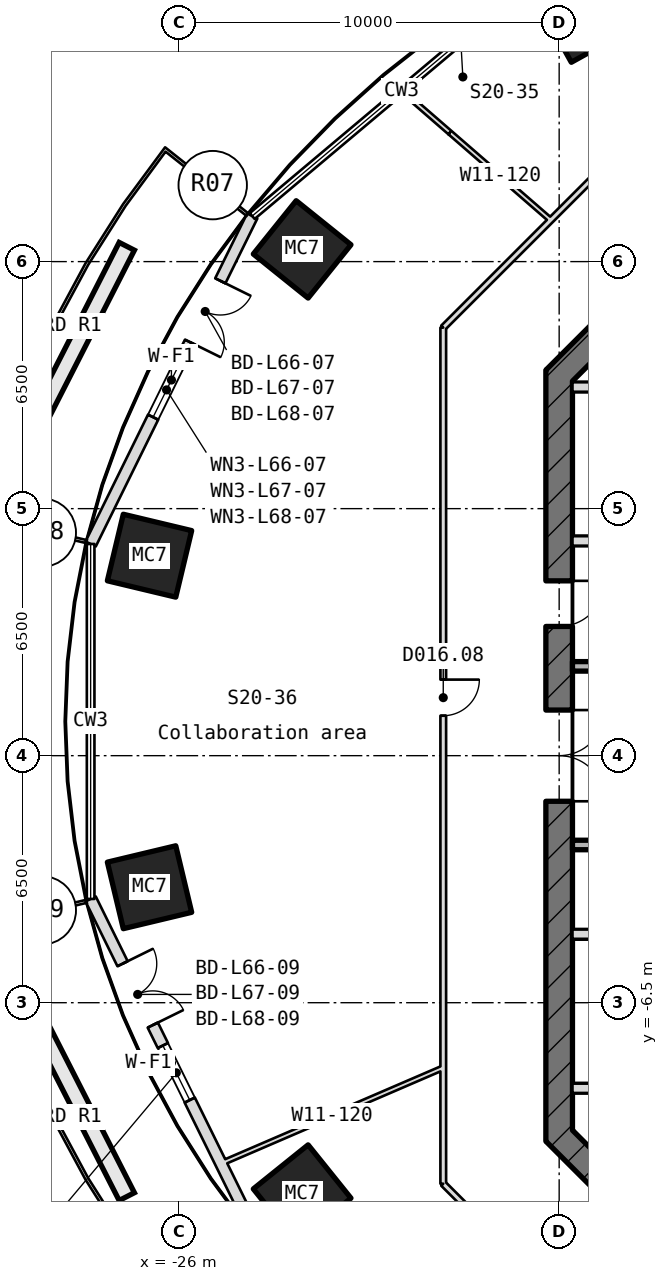
"""IFC4 building model, lengths in metres.
Left out: names, types, materials, properties, quantities, classifications, styles, units other than length and angle.
Written with IfcOpenShell. Run it as: python <this file> out.ifc"""

import sys

from ifc_helpers import new_model, si_unit, direction, frame, frame_2d, origin, origin_2d, place, context, subcontext, project, spatial, rectangle, hollow_rectangle, extrude, element, fill, save


model = new_model("IFC4")
c1 = context("Model", 3, precision=1e-05, world=origin(), true_north=direction((0.0, 1.0)))
c2 = subcontext(c1, "Body", "Model", "MODEL_VIEW")
j1 = project(units=[si_unit("LENGTHUNIT", "METRE"), si_unit("PLANEANGLEUNIT", "RADIAN")], contexts=[c1])
p1 = place(None, origin())
s1 = spatial("IfcSite", under=j1, at=p1, CompositionType="ELEMENT")
p2 = place(p1, origin())
s2 = spatial("IfcBuilding", under=s1, at=p2, CompositionType="ELEMENT")
p3 = place(p2, frame((0.0, 0.0, 296.95)))
s3 = spatial("IfcBuildingStorey", under=s2, at=p3, CompositionType="ELEMENT", Elevation=296.95)
for number, where, z_axis, x_axis in (
    (1, (-15.343, 19.49, -0.18), (0.0, 0.0, 1.0), (0.874, 0.486, 0.0)),
    (2, (-22.763, 13.321, -0.18), (0.0, 0.0, 1.0), (0.626, 0.779, 0.0)),
    (3, (-26.779, 5.262, -0.18), (0.0, 0.0, 1.0), (0.233, 0.973, 0.0)),
    (4, (-26.779, -3.462, -0.18), (0.0, 0.0, 1.0), (-0.233, 0.973, 0.0)),
    (5, (-22.763, -11.521, -0.18), (0.0, 0.0, 1.0), (-0.626, 0.779, 0.0)),
):
    element("IfcColumn", number, at=place(p3, frame(where, z_axis=z_axis, x_axis=x_axis)), inside=s3, PredefinedType="COLUMN", context=c2, shape_type="SweptSolid", body=[
        extrude(hollow_rectangle(XDim=1.8, YDim=1.85, WallThickness=0.06, at=origin_2d()), origin(), (0.0, 0.0, 1.0), 4.15),
    ])
p4 = place(p3, frame((-24.077, 14.199, 0.0), z_axis=(0.0, 0.0, 1.0), x_axis=(-0.441998272381, -0.897015901315, 0.0)))
e6 = element("IfcWall", 6, at=p4, inside=s3, PredefinedType="SOLIDWALL", context=c2, shape_type="SweptSolid", body=[
    extrude(rectangle(XDim=9.62, YDim=0.3, at=frame_2d((4.81, 0.0))), origin(), (0.0, 0.0, 1.0), 3.97),
])
p5 = place(p4, frame((1.9, 0.0, 0.0)))
e7 = element("IfcOpeningElement", 7, at=p5, cuts=e6, PredefinedType="OPENING", context=c2, shape_type="SweptSolid", body=[
    extrude(rectangle(XDim=1.8, YDim=2.4, at=frame_2d((0.9, 1.2))), frame((0.0, 0.16, 0.0), z_axis=(0.0, -1.0, 0.0), x_axis=(1.0, 0.0, 0.0)), (0.0, 0.0, 1.0), 0.32),
])
p6 = place(p4, frame((4.3, 0.0, 0.9)))
e8 = element("IfcOpeningElement", 8, at=p6, cuts=e6, PredefinedType="OPENING", context=c2, shape_type="SweptSolid", body=[
    extrude(rectangle(XDim=1.6, YDim=1.5, at=frame_2d((0.8, 0.75))), frame((0.0, 0.16, 0.0), z_axis=(0.0, -1.0, 0.0), x_axis=(1.0, 0.0, 0.0)), (0.0, 0.0, 1.0), 0.32),
])
p7 = place(p3, frame((-28.329, -3.77, 0.0), z_axis=(0.0, 0.0, 1.0), x_axis=(0.441998272381, -0.897015901315, 0.0)))
e9 = element("IfcWall", 9, at=p7, inside=s3, PredefinedType="SOLIDWALL", context=c2, shape_type="SweptSolid", body=[
    extrude(rectangle(XDim=9.62, YDim=0.3, at=frame_2d((4.81, 0.0))), origin(), (0.0, 0.0, 1.0), 3.97),
])
p8 = place(p7, frame((1.9, 0.0, 0.0)))
e10 = element("IfcOpeningElement", 10, at=p8, cuts=e9, PredefinedType="OPENING", context=c2, shape_type="SweptSolid", body=[
    extrude(rectangle(XDim=1.8, YDim=2.4, at=frame_2d((0.9, 1.2))), frame((0.0, 0.16, 0.0), z_axis=(0.0, -1.0, 0.0), x_axis=(1.0, 0.0, 0.0)), (0.0, 0.0, 1.0), 0.32),
])
p9 = place(p7, frame((4.3, 0.0, 0.9)))
e11 = element("IfcOpeningElement", 11, at=p9, cuts=e9, PredefinedType="OPENING", context=c2, shape_type="SweptSolid", body=[
    extrude(rectangle(XDim=1.6, YDim=1.5, at=frame_2d((0.8, 0.75))), frame((0.0, 0.16, 0.0), z_axis=(0.0, -1.0, 0.0), x_axis=(1.0, 0.0, 0.0)), (0.0, 0.0, 1.0), 0.32),
])
p10 = place(p3, frame((-12.897, 13.103, -0.18), z_axis=(0.0, 0.0, 1.0), x_axis=(-0.707106781187, -0.707106781187, 0.0)))
e12 = element("IfcWall", 12, at=p10, inside=s3, PredefinedType="SHEAR", context=c2, shape_type="SweptSolid", body=[
    extrude(rectangle(XDim=4.533, YDim=0.7, at=frame_2d((2.266, 0.0))), origin(), (0.0, 0.0, 1.0), 4.15),
])
p11 = place(p3, frame((-16.0, 10.145, -0.18), z_axis=(0.0, 0.0, 1.0), x_axis=(0.0, -1.0, 0.0)))
e13 = element("IfcWall", 13, at=p11, inside=s3, PredefinedType="SHEAR", context=c2, shape_type="SweptSolid", body=[
    extrude(rectangle(XDim=20.29, YDim=0.7, at=frame_2d((10.145, 0.0))), origin(), (0.0, 0.0, 1.0), 4.15),
])
p12 = place(p11, frame((8.945, 0.0, 0.18)))
e14 = element("IfcOpeningElement", 14, at=p12, cuts=e13, PredefinedType="OPENING", context=c2, shape_type="SweptSolid", body=[
    extrude(rectangle(XDim=2.4, YDim=2.1, at=frame_2d((1.2, 1.05))), frame((0.0, 0.36, 0.0), z_axis=(0.0, -1.0, 0.0), x_axis=(1.0, 0.0, 0.0)), (0.0, 0.0, 1.0), 0.72),
])
p13 = place(p11, frame((5.545, 0.0, 0.18)))
e15 = element("IfcOpeningElement", 15, at=p13, cuts=e13, PredefinedType="OPENING", context=c2, shape_type="SweptSolid", body=[
    extrude(rectangle(XDim=1.2, YDim=2.1, at=frame_2d((0.6, 1.05))), frame((0.0, 0.36, 0.0), z_axis=(0.0, -1.0, 0.0), x_axis=(1.0, 0.0, 0.0)), (0.0, 0.0, 1.0), 0.72),
])
p14 = place(p3, frame((-16.103, -9.897, -0.18), z_axis=(0.0, 0.0, 1.0), x_axis=(0.707106781187, -0.707106781187, 0.0)))
e16 = element("IfcWall", 16, at=p14, inside=s3, PredefinedType="SHEAR", context=c2, shape_type="SweptSolid", body=[
    extrude(rectangle(XDim=4.533, YDim=0.7, at=frame_2d((2.266, 0.0))), origin(), (0.0, 0.0, 1.0), 4.15),
])
p15 = place(p3, frame((-15.65, -8.75, -0.18), z_axis=(0.0, 0.0, 1.0), x_axis=(1.0, 0.0, 0.0)))
e17 = element("IfcWall", 17, at=p15, inside=s3, PredefinedType="SHEAR", context=c2, shape_type="SweptSolid", body=[
    extrude(rectangle(XDim=7.1, YDim=0.25, at=frame_2d((3.55, 0.0))), origin(), (0.0, 0.0, 1.0), 4.15),
])
p16 = place(p15, frame((5.6, 0.0, 0.18)))
e18 = element("IfcOpeningElement", 18, at=p16, cuts=e17, PredefinedType="OPENING", context=c2, shape_type="SweptSolid", body=[
    extrude(rectangle(XDim=1.2, YDim=2.1, at=frame_2d((0.6, 1.05))), frame((0.0, 0.135, 0.0), z_axis=(0.0, -1.0, 0.0), x_axis=(1.0, 0.0, 0.0)), (0.0, 0.0, 1.0), 0.27),
])
p17 = place(p3, frame((-15.65, -4.7, -0.18), z_axis=(0.0, 0.0, 1.0), x_axis=(1.0, 0.0, 0.0)))
e19 = element("IfcWall", 19, at=p17, inside=s3, PredefinedType="SHEAR", context=c2, shape_type="SweptSolid", body=[
    extrude(rectangle(XDim=7.1, YDim=0.25, at=frame_2d((3.55, 0.0))), origin(), (0.0, 0.0, 1.0), 4.15),
])
for number, where, z_axis, x_axis in (
    (20, (-15.65, -2.35, 0.0), (0.0, 0.0, 1.0), (1.0, 0.0, 0.0)),
    (21, (-15.65, 2.35, 0.0), (0.0, 0.0, 1.0), (1.0, 0.0, 0.0)),
):
    element("IfcWall", number, at=place(p3, frame(where, z_axis=z_axis, x_axis=x_axis)), inside=s3, PredefinedType="STANDARD", context=c2, shape_type="SweptSolid", body=[
        extrude(rectangle(XDim=7.25, YDim=0.25, at=frame_2d((3.625, 0.0))), origin(), (0.0, 0.0, 1.0), 3.97),
    ])
p18 = place(p3, frame((-15.65, 5.65, -0.18), z_axis=(0.0, 0.0, 1.0), x_axis=(1.0, 0.0, 0.0)))
e22 = element("IfcWall", 22, at=p18, inside=s3, PredefinedType="SHEAR", context=c2, shape_type="SweptSolid", body=[
    extrude(rectangle(XDim=7.1, YDim=0.25, at=frame_2d((3.55, 0.0))), origin(), (0.0, 0.0, 1.0), 4.15),
])
p19 = place(p18, frame((0.55, 0.0, 0.18)))
e23 = element("IfcOpeningElement", 23, at=p19, cuts=e22, PredefinedType="OPENING", context=c2, shape_type="SweptSolid", body=[
    extrude(rectangle(XDim=1.2, YDim=2.1, at=frame_2d((0.6, 1.05))), frame((0.0, 0.135, 0.0), z_axis=(0.0, -1.0, 0.0), x_axis=(1.0, 0.0, 0.0)), (0.0, 0.0, 1.0), 0.27),
])
p20 = place(p3, frame((-15.65, 9.7, -0.18), z_axis=(0.0, 0.0, 1.0), x_axis=(1.0, 0.0, 0.0)))
e24 = element("IfcWall", 24, at=p20, inside=s3, PredefinedType="SHEAR", context=c2, shape_type="SweptSolid", body=[
    extrude(rectangle(XDim=7.1, YDim=0.25, at=frame_2d((3.55, 0.0))), origin(), (0.0, 0.0, 1.0), 4.15),
])
p21 = place(p3, frame((-19.05, -11.263, 0.0), z_axis=(0.0, 0.0, 1.0), x_axis=(0.0, 1.0, 0.0)))
e25 = element("IfcWall", 25, at=p21, inside=s3, PredefinedType="PARTITIONING", context=c2, shape_type="SweptSolid", body=[
    extrude(rectangle(XDim=22.527, YDim=0.15, at=frame_2d((11.263, 0.0))), origin(), (0.0, 0.0, 1.0), 3.97),
])
p22 = place(p21, frame((12.315, 0.0, 0.0)))
e26 = element("IfcOpeningElement", 26, at=p22, cuts=e25, PredefinedType="OPENING", context=c2, shape_type="SweptSolid", body=[
    extrude(rectangle(XDim=0.95, YDim=2.1, at=frame_2d((0.475, 1.05))), frame((0.0, 0.085, 0.0), z_axis=(0.0, -1.0, 0.0), x_axis=(1.0, 0.0, 0.0)), (0.0, 0.0, 1.0), 0.17),
])
p23 = place(p3, frame((-19.05, -8.21, 0.0), z_axis=(0.0, 0.0, 1.0), x_axis=(-0.918342103528, -0.39578754514, 0.0)))
e27 = element("IfcWall", 27, at=p23, inside=s3, PredefinedType="PARTITIONING", context=c2, shape_type="SweptSolid", body=[
    extrude(rectangle(XDim=6.369, YDim=0.12, at=frame_2d((3.185, 0.0))), origin(), (0.0, 0.0, 1.0), 3.97),
])
p24 = place(p3, frame((-19.05, 11.263, 0.0), z_axis=(0.0, 0.0, 1.0), x_axis=(0.707106781187, 0.707106781187, 0.0)))
e28 = element("IfcWall", 28, at=p24, inside=s3, PredefinedType="PARTITIONING", context=c2, shape_type="SweptSolid", body=[
    extrude(rectangle(XDim=6.769, YDim=0.15, at=frame_2d((3.385, 0.0))), origin(), (0.0, 0.0, 1.0), 3.97),
])
p25 = place(p3, frame((-16.222, 14.091, 0.0), z_axis=(0.0, 0.0, 1.0), x_axis=(-0.75497337259, 0.655755447313, 0.0)))
e29 = element("IfcWall", 29, at=p25, inside=s3, PredefinedType="PARTITIONING", context=c2, shape_type="SweptSolid", body=[
    extrude(rectangle(XDim=3.514, YDim=0.12, at=frame_2d((1.757, 0.0))), origin(), (0.0, 0.0, 1.0), 3.66),
])
p26 = place(p3, frame((-18.875, 16.395, 0.0), z_axis=(0.0, 0.0, 1.0), x_axis=(-0.754938829858, 0.655795214357, 0.0)))
e30 = element("IfcWall", 30, at=p26, inside=s3, PredefinedType="PARTITIONING", context=c2, shape_type="SweptSolid", body=[
    extrude(rectangle(XDim=1.687, YDim=0.12, at=frame_2d((0.843, 0.0))), origin(), (0.0, 0.0, 1.0), 3.97),
])
p27 = place(p3, frame((-14.263, -16.05, 0.0), z_axis=(0.0, 0.0, 1.0), x_axis=(-0.707106781187, 0.707106781187, 0.0)))
e31 = element("IfcWall", 31, at=p27, inside=s3, PredefinedType="PARTITIONING", context=c2, shape_type="SweptSolid", body=[
    extrude(rectangle(XDim=6.769, YDim=0.15, at=frame_2d((3.385, 0.0))), origin(), (0.0, 0.0, 1.0), 3.97),
])
p28 = place(p5, origin())
e32 = element("IfcDoor", 32, at=p28, inside=s3, OperationType="SINGLE_SWING_LEFT", PredefinedType="DOOR", context=c2, shape_type="SweptSolid", body=[
    extrude(rectangle(XDim=1.8, YDim=2.4, at=frame_2d((0.9, 1.2))), frame((0.0, 0.025, 0.0), z_axis=(0.0, -1.0, 0.0), x_axis=(1.0, 0.0, 0.0)), (0.0, 0.0, 1.0), 0.05),
])
fill(e7, e32)
p29 = place(p6, origin())
e33 = element("IfcWindow", 33, at=p29, inside=s3, PartitioningType="SINGLE_PANEL", PredefinedType="WINDOW", context=c2, shape_type="SweptSolid", body=[
    extrude(rectangle(XDim=1.6, YDim=1.5, at=frame_2d((0.8, 0.75))), frame((0.0, 0.03, 0.0), z_axis=(0.0, -1.0, 0.0), x_axis=(1.0, 0.0, 0.0)), (0.0, 0.0, 1.0), 0.06),
])
fill(e8, e33)
p30 = place(p8, origin())
e34 = element("IfcDoor", 34, at=p30, inside=s3, OperationType="SINGLE_SWING_LEFT", PredefinedType="DOOR", context=c2, shape_type="SweptSolid", body=[
    extrude(rectangle(XDim=1.8, YDim=2.4, at=frame_2d((0.9, 1.2))), frame((0.0, 0.025, 0.0), z_axis=(0.0, -1.0, 0.0), x_axis=(1.0, 0.0, 0.0)), (0.0, 0.0, 1.0), 0.05),
])
fill(e10, e34)
p31 = place(p9, origin())
e35 = element("IfcWindow", 35, at=p31, inside=s3, PartitioningType="SINGLE_PANEL", PredefinedType="WINDOW", context=c2, shape_type="SweptSolid", body=[
    extrude(rectangle(XDim=1.6, YDim=1.5, at=frame_2d((0.8, 0.75))), frame((0.0, 0.03, 0.0), z_axis=(0.0, -1.0, 0.0), x_axis=(1.0, 0.0, 0.0)), (0.0, 0.0, 1.0), 0.06),
])
fill(e11, e35)
p32 = place(p12, origin())
e36 = element("IfcDoor", 36, at=p32, inside=s3, OperationType="DOUBLE_DOOR_SINGLE_SWING", PredefinedType="DOOR", context=c2, shape_type="SweptSolid", body=[
    extrude(rectangle(XDim=2.4, YDim=2.1, at=frame_2d((1.2, 1.05))), frame((0.0, 0.025, 0.0), z_axis=(0.0, -1.0, 0.0), x_axis=(1.0, 0.0, 0.0)), (0.0, 0.0, 1.0), 0.05),
])
fill(e14, e36)
p33 = place(p13, origin())
e37 = element("IfcDoor", 37, at=p33, inside=s3, OperationType="SINGLE_SWING_RIGHT", PredefinedType="DOOR", context=c2, shape_type="SweptSolid", body=[
    extrude(rectangle(XDim=1.2, YDim=2.1, at=frame_2d((0.6, 1.05))), frame((0.0, 0.025, 0.0), z_axis=(0.0, -1.0, 0.0), x_axis=(1.0, 0.0, 0.0)), (0.0, 0.0, 1.0), 0.05),
])
fill(e15, e37)
p34 = place(p22, frame((0.95, 0.0, 0.0), z_axis=(0.0, 0.0, 1.0), x_axis=(-1.0, 0.0, 0.0)))
e38 = element("IfcDoor", 38, at=p34, inside=s3, OperationType="SINGLE_SWING_LEFT", PredefinedType="DOOR", context=c2, shape_type="SweptSolid", body=[
    extrude(rectangle(XDim=0.95, YDim=2.1, at=frame_2d((0.475, 1.05))), frame((0.0, 0.025, 0.0), z_axis=(0.0, -1.0, 0.0), x_axis=(1.0, 0.0, 0.0)), (0.0, 0.0, 1.0), 0.05),
])
fill(e26, e38)
save(model, sys.argv[1])
